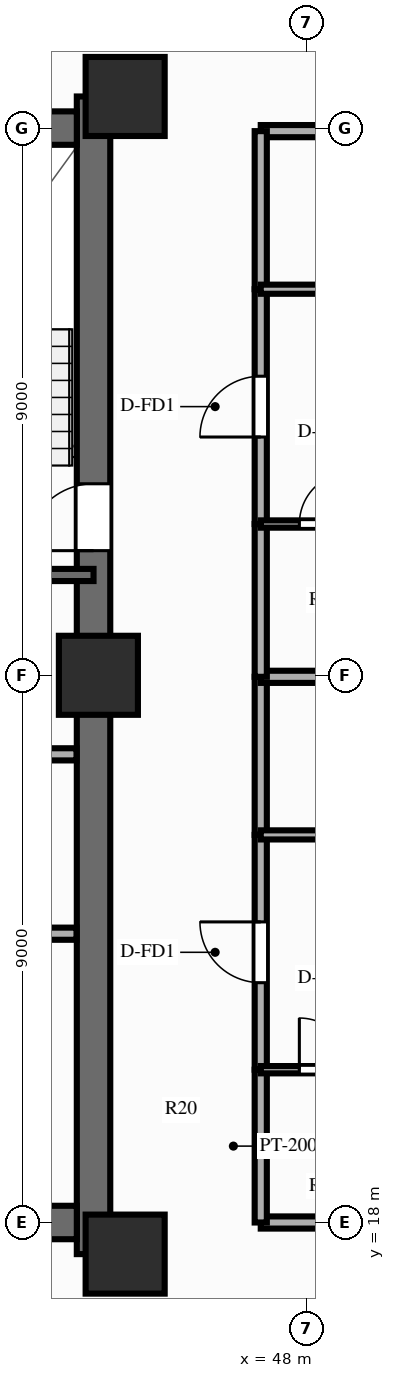
"""IFC4 building model, lengths in metres.
Left out: names, types, materials, properties, quantities, classifications, styles, units other than length and angle.
Written with IfcOpenShell. Run it as: python <this file> out.ifc"""

import sys

from ifc_helpers import new_model, si_unit, direction, frame, frame_2d, origin, origin_2d, place, context, subcontext, project, spatial, rectangle, extrude, source, transform, mapped, element, fill, save


model = new_model("IFC4")
c1 = context("Model", 3, precision=1e-05, world=origin(), true_north=direction((0.0, 1.0)))
c2 = subcontext(c1, "Body", "Model", "MODEL_VIEW")
j1 = project(units=[si_unit("LENGTHUNIT", "METRE"), si_unit("PLANEANGLEUNIT", "RADIAN")], contexts=[c1])
p1 = place(None, origin())
s1 = spatial("IfcSite", under=j1, at=p1, CompositionType="ELEMENT")
p2 = place(p1, origin())
s2 = spatial("IfcBuilding", under=s1, at=p2, CompositionType="ELEMENT")
p3 = place(p2, frame((0.0, 0.0, 83.85)))
s3 = spatial("IfcBuildingStorey", under=s2, at=p3, CompositionType="ELEMENT", Elevation=83.85)
p4 = place(p3, frame((44.5, 17.48, 0.0), z_axis=(0.0, 0.0, 1.0), x_axis=(0.0, 1.0, 0.0)))
e1 = element("IfcWall", 1, at=p4, inside=s3, PredefinedType="SHEAR", context=c2, shape_type="SweptSolid", body=[
    extrude(rectangle(XDim=19.04, YDim=0.55, at=frame_2d((9.52, 0.0))), origin(), (0.0, 0.0, 1.0), 3.0),
])
p5 = place(p4, frame((12.67, 0.0, 0.0), z_axis=(0.0, 0.0, 1.0), x_axis=(-1.0, 0.0, 0.0)))
e2 = element("IfcOpeningElement", 2, at=p5, cuts=e1, PredefinedType="OPENING", context=c2, shape_type="SweptSolid", body=[
    extrude(rectangle(XDim=1.1, YDim=2.15, at=frame_2d((0.55, 1.075))), frame((0.0, 0.287, 0.0), z_axis=(0.0, -1.0, 0.0), x_axis=(1.0, 0.0, 0.0)), (0.0, 0.0, 1.0), 0.574),
])
p6 = place(p3, frame((31.775, 18.0, 0.0), z_axis=(0.0, 0.0, 1.0), x_axis=(1.0, 0.0, 0.0)))
e3 = element("IfcWall", 3, at=p6, inside=s3, PredefinedType="SHEAR", context=c2, shape_type="SweptSolid", body=[
    extrude(rectangle(XDim=12.45, YDim=0.55, at=frame_2d((6.225, 0.0))), origin(), (0.0, 0.0, 1.0), 3.0),
])
p7 = place(p3, frame((31.775, 36.0, 0.0), z_axis=(0.0, 0.0, 1.0), x_axis=(1.0, 0.0, 0.0)))
e4 = element("IfcWall", 4, at=p7, inside=s3, PredefinedType="SHEAR", context=c2, shape_type="SweptSolid", body=[
    extrude(rectangle(XDim=12.45, YDim=0.55, at=frame_2d((6.225, 0.0))), origin(), (0.0, 0.0, 1.0), 3.0),
])
p8 = place(p7, frame((5.175, 0.0, 0.0), z_axis=(0.0, 0.0, 1.0), x_axis=(-1.0, 0.0, 0.0)))
e5 = element("IfcOpeningElement", 5, at=p8, cuts=e4, PredefinedType="OPENING", context=c2, shape_type="SweptSolid", body=[
    extrude(rectangle(XDim=1.4, YDim=2.15, at=frame_2d((0.7, 1.075))), frame((0.0, 0.287, 0.0), z_axis=(0.0, -1.0, 0.0), x_axis=(1.0, 0.0, 0.0)), (0.0, 0.0, 1.0), 0.574),
])
m1 = source(origin(), c2, "Body", "SweptSolid", [
    extrude(rectangle(XDim=1.3, YDim=1.3, at=origin_2d()), origin(), (0.0, 0.0, 1.0), 3.0),
])
for number, where, z_axis, x_axis in (
    (6, (45.02, 17.48, 0.0), (0.0, 0.0, 1.0), (1.0, 0.0, 0.0)),
    (7, (45.02, 36.52, 0.0), (0.0, 0.0, 1.0), (1.0, 0.0, 0.0)),
    (8, (44.58, 27.0, 0.0), (0.0, 0.0, 1.0), (1.0, 0.0, 0.0)),
):
    element("IfcColumn", number, at=place(p3, frame(where, z_axis=z_axis, x_axis=x_axis)), inside=s3, PredefinedType="COLUMN", context=c2, shape_type="MappedRepresentation", body=[
        mapped(m1, transform((0.0, 0.0, 0.0), scale=1.0)),
    ])
p9 = place(p3, frame((41.55, 22.75, 0.0), z_axis=(0.0, 0.0, 1.0), x_axis=(1.0, 0.0, 0.0)))
e9 = element("IfcWall", 9, at=p9, inside=s3, PredefinedType="PARTITIONING", context=c2, shape_type="SweptSolid", body=[
    extrude(rectangle(XDim=2.67, YDim=0.2, at=frame_2d((1.335, 0.0))), origin(), (0.0, 0.0, 1.0), 2.79),
])
p10 = place(p3, frame((41.55, 25.7, 0.0), z_axis=(0.0, 0.0, 1.0), x_axis=(1.0, 0.0, 0.0)))
e10 = element("IfcWall", 10, at=p10, inside=s3, PredefinedType="PARTITIONING", context=c2, shape_type="SweptSolid", body=[
    extrude(rectangle(XDim=2.67, YDim=0.2, at=frame_2d((1.335, 0.0))), origin(), (0.0, 0.0, 1.0), 2.14),
])
p11 = place(p3, frame((40.57, 28.65, 0.0), z_axis=(0.0, 0.0, 1.0), x_axis=(1.0, 0.0, 0.0)))
e11 = element("IfcWall", 11, at=p11, inside=s3, PredefinedType="SOLIDWALL", context=c2, shape_type="SweptSolid", body=[
    extrude(rectangle(XDim=3.93, YDim=0.2, at=frame_2d((1.965, 0.0))), origin(), (0.0, 0.0, 1.0), 2.79),
])
for number, where, z_axis, x_axis in (
    (12, (47.25, 18.0, 0.0), (0.0, 0.0, 1.0), (1.0, 0.0, 0.0)),
    (13, (47.25, 35.95, 0.0), (0.0, 0.0, 1.0), (1.0, 0.0, 0.0)),
):
    element("IfcWall", number, at=place(p3, frame(where, z_axis=z_axis, x_axis=x_axis)), inside=s3, PredefinedType="PARTITIONING", context=c2, shape_type="SweptSolid", body=[
        extrude(rectangle(XDim=16.6, YDim=0.2, at=frame_2d((8.3, 0.0))), origin(), (0.0, 0.0, 1.0), 2.34),
    ])
p12 = place(p3, frame((47.25, 18.0, 0.0), z_axis=(0.0, 0.0, 1.0), x_axis=(0.0, 1.0, 0.0)))
e14 = element("IfcWall", 14, at=p12, inside=s3, PredefinedType="PARTITIONING", context=c2, shape_type="SweptSolid", body=[
    extrude(rectangle(XDim=2.513, YDim=0.2, at=frame_2d((1.256, 0.0))), origin(), (0.0, 0.0, 1.0), 2.79),
])
p13 = place(p3, frame((47.25, 20.513, 0.0), z_axis=(0.0, 0.0, 1.0), x_axis=(0.0, 1.0, 0.0)))
e15 = element("IfcWall", 15, at=p13, inside=s3, PredefinedType="PARTITIONING", context=c2, shape_type="SweptSolid", body=[
    extrude(rectangle(XDim=3.862, YDim=0.2, at=frame_2d((1.931, 0.0))), origin(), (0.0, 0.0, 1.0), 2.79),
])
p14 = place(p13, frame((1.431, 0.0, 0.0)))
e16 = element("IfcOpeningElement", 16, at=p14, cuts=e15, PredefinedType="OPENING", context=c2, shape_type="SweptSolid", body=[
    extrude(rectangle(XDim=1.0, YDim=2.15, at=frame_2d((0.5, 1.075))), frame((0.0, 0.112, 0.0), z_axis=(0.0, -1.0, 0.0), x_axis=(1.0, 0.0, 0.0)), (0.0, 0.0, 1.0), 0.224),
])
p15 = place(p3, frame((47.25, 24.375, 0.0), z_axis=(0.0, 0.0, 1.0), x_axis=(0.0, 1.0, 0.0)))
e17 = element("IfcWall", 17, at=p15, inside=s3, PredefinedType="PARTITIONING", context=c2, shape_type="SweptSolid", body=[
    extrude(rectangle(XDim=2.6, YDim=0.2, at=frame_2d((1.3, 0.0))), origin(), (0.0, 0.0, 1.0), 2.79),
])
p16 = place(p3, frame((47.25, 20.513, 0.0), z_axis=(0.0, 0.0, 1.0), x_axis=(1.0, 0.0, 0.0)))
e18 = element("IfcWall", 18, at=p16, inside=s3, PredefinedType="PARTITIONING", context=c2, shape_type="SweptSolid", body=[
    extrude(rectangle(XDim=2.12, YDim=0.12, at=frame_2d((1.06, 0.0))), origin(), (0.0, 0.0, 1.0), 2.79),
])
p17 = place(p16, frame((0.635, 0.0, 0.0)))
e19 = element("IfcOpeningElement", 19, at=p17, cuts=e18, PredefinedType="OPENING", context=c2, shape_type="SweptSolid", body=[
    extrude(rectangle(XDim=0.85, YDim=2.05, at=frame_2d((0.425, 1.025))), frame((0.0, 0.072, 0.0), z_axis=(0.0, -1.0, 0.0), x_axis=(1.0, 0.0, 0.0)), (0.0, 0.0, 1.0), 0.144),
])
p18 = place(p3, frame((47.25, 24.375, 0.0), z_axis=(0.0, 0.0, 1.0), x_axis=(1.0, 0.0, 0.0)))
e20 = element("IfcWall", 20, at=p18, inside=s3, PredefinedType="PARTITIONING", context=c2, shape_type="SweptSolid", body=[
    extrude(rectangle(XDim=2.86, YDim=0.15, at=frame_2d((1.43, 0.0))), origin(), (0.0, 0.0, 1.0), 2.79),
])
p19 = place(p18, frame((0.98, 0.0, 0.0)))
e21 = element("IfcOpeningElement", 21, at=p19, cuts=e20, PredefinedType="OPENING", context=c2, shape_type="SweptSolid", body=[
    extrude(rectangle(XDim=0.9, YDim=2.1, at=frame_2d((0.45, 1.05))), frame((0.0, 0.087, 0.0), z_axis=(0.0, -1.0, 0.0), x_axis=(1.0, 0.0, 0.0)), (0.0, 0.0, 1.0), 0.174),
])
p20 = place(p3, frame((47.25, 26.975, 0.0), z_axis=(0.0, 0.0, 1.0), x_axis=(1.0, 0.0, 0.0)))
e22 = element("IfcWall", 22, at=p20, inside=s3, PredefinedType="PARTITIONING", context=c2, shape_type="SweptSolid", body=[
    extrude(rectangle(XDim=16.6, YDim=0.2, at=frame_2d((8.3, 0.0))), origin(), (0.0, 0.0, 1.0), 2.79),
])
p21 = place(p3, frame((47.25, 26.975, 0.0), z_axis=(0.0, 0.0, 1.0), x_axis=(0.0, 1.0, 0.0)))
e23 = element("IfcWall", 23, at=p21, inside=s3, PredefinedType="PARTITIONING", context=c2, shape_type="SweptSolid", body=[
    extrude(rectangle(XDim=2.513, YDim=0.2, at=frame_2d((1.256, 0.0))), origin(), (0.0, 0.0, 1.0), 2.79),
])
p22 = place(p3, frame((47.25, 29.488, 0.0), z_axis=(0.0, 0.0, 1.0), x_axis=(0.0, 1.0, 0.0)))
e24 = element("IfcWall", 24, at=p22, inside=s3, PredefinedType="PARTITIONING", context=c2, shape_type="SweptSolid", body=[
    extrude(rectangle(XDim=3.862, YDim=0.2, at=frame_2d((1.931, 0.0))), origin(), (0.0, 0.0, 1.0), 2.79),
])
p23 = place(p22, frame((1.431, 0.0, 0.0)))
e25 = element("IfcOpeningElement", 25, at=p23, cuts=e24, PredefinedType="OPENING", context=c2, shape_type="SweptSolid", body=[
    extrude(rectangle(XDim=1.0, YDim=2.15, at=frame_2d((0.5, 1.075))), frame((0.0, 0.112, 0.0), z_axis=(0.0, -1.0, 0.0), x_axis=(1.0, 0.0, 0.0)), (0.0, 0.0, 1.0), 0.224),
])
p24 = place(p3, frame((47.25, 33.35, 0.0), z_axis=(0.0, 0.0, 1.0), x_axis=(0.0, 1.0, 0.0)))
e26 = element("IfcWall", 26, at=p24, inside=s3, PredefinedType="PARTITIONING", context=c2, shape_type="SweptSolid", body=[
    extrude(rectangle(XDim=2.6, YDim=0.2, at=frame_2d((1.3, 0.0))), origin(), (0.0, 0.0, 1.0), 2.79),
])
p25 = place(p3, frame((47.25, 29.488, 0.0), z_axis=(0.0, 0.0, 1.0), x_axis=(1.0, 0.0, 0.0)))
e27 = element("IfcWall", 27, at=p25, inside=s3, PredefinedType="PARTITIONING", context=c2, shape_type="SweptSolid", body=[
    extrude(rectangle(XDim=2.12, YDim=0.12, at=frame_2d((1.06, 0.0))), origin(), (0.0, 0.0, 1.0), 2.79),
])
p26 = place(p25, frame((0.635, 0.0, 0.0)))
e28 = element("IfcOpeningElement", 28, at=p26, cuts=e27, PredefinedType="OPENING", context=c2, shape_type="SweptSolid", body=[
    extrude(rectangle(XDim=0.85, YDim=2.05, at=frame_2d((0.425, 1.025))), frame((0.0, 0.072, 0.0), z_axis=(0.0, -1.0, 0.0), x_axis=(1.0, 0.0, 0.0)), (0.0, 0.0, 1.0), 0.144),
])
p27 = place(p3, frame((47.25, 33.35, 0.0), z_axis=(0.0, 0.0, 1.0), x_axis=(1.0, 0.0, 0.0)))
e29 = element("IfcWall", 29, at=p27, inside=s3, PredefinedType="PARTITIONING", context=c2, shape_type="SweptSolid", body=[
    extrude(rectangle(XDim=2.86, YDim=0.15, at=frame_2d((1.43, 0.0))), origin(), (0.0, 0.0, 1.0), 2.79),
])
p28 = place(p27, frame((0.98, 0.0, 0.0)))
e30 = element("IfcOpeningElement", 30, at=p28, cuts=e29, PredefinedType="OPENING", context=c2, shape_type="SweptSolid", body=[
    extrude(rectangle(XDim=0.9, YDim=2.1, at=frame_2d((0.45, 1.05))), frame((0.0, 0.087, 0.0), z_axis=(0.0, -1.0, 0.0), x_axis=(1.0, 0.0, 0.0)), (0.0, 0.0, 1.0), 0.174),
])
m2 = source(origin(), c2, "Body", "SweptSolid", [
    extrude(rectangle(XDim=1.1, YDim=2.15, at=frame_2d((0.55, 1.075))), frame((0.0, 0.025, 0.0), z_axis=(0.0, -1.0, 0.0), x_axis=(1.0, 0.0, 0.0)), (0.0, 0.0, 1.0), 0.05),
])
p29 = place(p5, origin())
e31 = element("IfcDoor", 31, at=p29, inside=s3, OperationType="SINGLE_SWING_RIGHT", PredefinedType="DOOR", context=c2, shape_type="MappedRepresentation", body=[
    mapped(m2, transform((0.0, 0.0, 0.0), scale=1.0)),
])
fill(e2, e31)
m3 = source(origin(), c2, "Body", "SweptSolid", [
    extrude(rectangle(XDim=1.0, YDim=2.15, at=frame_2d((0.5, 1.075))), frame((0.0, 0.025, 0.0), z_axis=(0.0, -1.0, 0.0), x_axis=(1.0, 0.0, 0.0)), (0.0, 0.0, 1.0), 0.05),
])
p30 = place(p14, origin())
e32 = element("IfcDoor", 32, at=p30, inside=s3, OperationType="SINGLE_SWING_RIGHT", PredefinedType="DOOR", context=c2, shape_type="MappedRepresentation", body=[
    mapped(m3, transform((0.0, 0.0, 0.0), scale=1.0)),
])
fill(e16, e32)
m4 = source(origin(), c2, "Body", "SweptSolid", [
    extrude(rectangle(XDim=0.85, YDim=2.05, at=frame_2d((0.425, 1.025))), frame((0.0, 0.025, 0.0), z_axis=(0.0, -1.0, 0.0), x_axis=(1.0, 0.0, 0.0)), (0.0, 0.0, 1.0), 0.05),
])
p31 = place(p17, origin())
e33 = element("IfcDoor", 33, at=p31, inside=s3, OperationType="SINGLE_SWING_LEFT", PredefinedType="DOOR", context=c2, shape_type="MappedRepresentation", body=[
    mapped(m4, transform((0.0, 0.0, 0.0), scale=1.0)),
])
fill(e19, e33)
p32 = place(p23, origin())
e34 = element("IfcDoor", 34, at=p32, inside=s3, OperationType="SINGLE_SWING_LEFT", PredefinedType="DOOR", context=c2, shape_type="MappedRepresentation", body=[
    mapped(m3, transform((0.0, 0.0, 0.0), scale=1.0)),
])
fill(e25, e34)
p33 = place(p26, origin())
e35 = element("IfcDoor", 35, at=p33, inside=s3, OperationType="SINGLE_SWING_RIGHT", PredefinedType="DOOR", context=c2, shape_type="MappedRepresentation", body=[
    mapped(m4, transform((0.0, 0.0, 0.0), scale=1.0)),
])
fill(e28, e35)
save(model, sys.argv[1])
